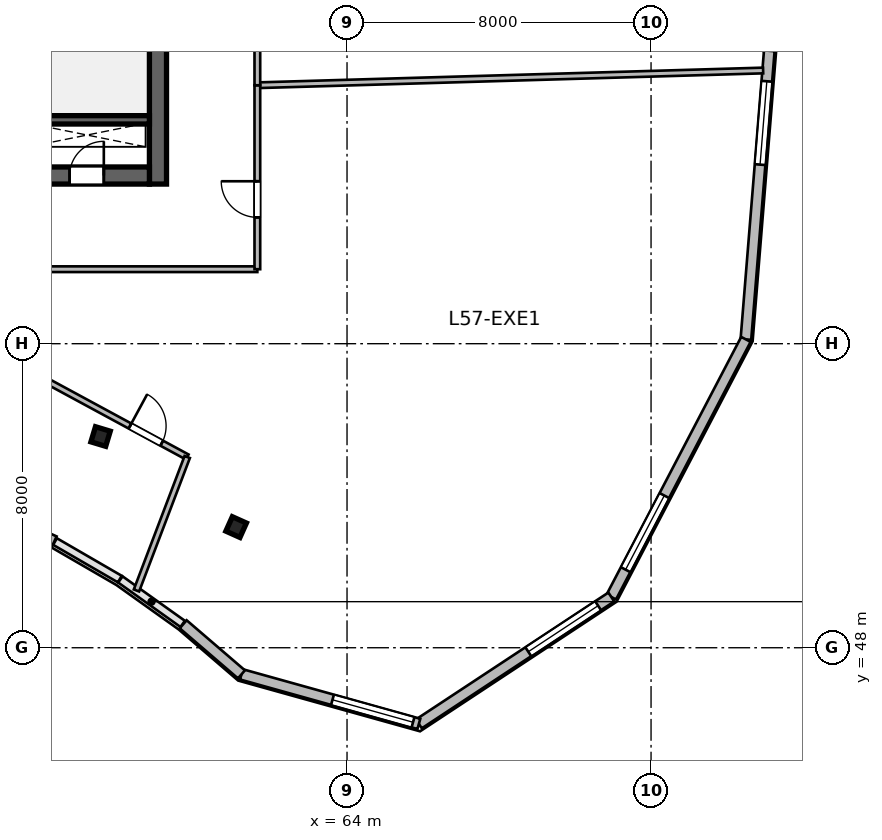
"""IFC4 building model, lengths in metres.
Left out: names, types, materials, properties, quantities, classifications, styles, units other than length and angle.
Written with IfcOpenShell. Run it as: python <this file> out.ifc"""

import sys

from ifc_helpers import new_model, si_unit, direction, frame, frame_2d, origin, origin_2d, place, context, subcontext, project, spatial, rectangle, i_section, extrude, source, transform, mapped, element, fill, save


model = new_model("IFC4")
c1 = context("Model", 3, precision=1e-05, world=origin(), true_north=direction((0.0, 1.0)))
c2 = subcontext(c1, "Body", "Model", "MODEL_VIEW")
j1 = project(units=[si_unit("LENGTHUNIT", "METRE"), si_unit("PLANEANGLEUNIT", "RADIAN")], contexts=[c1])
p1 = place(None, origin())
s1 = spatial("IfcSite", under=j1, at=p1, CompositionType="ELEMENT")
p2 = place(p1, origin())
s2 = spatial("IfcBuilding", under=s1, at=p2, CompositionType="ELEMENT")
p3 = place(p2, frame((0.0, 0.0, 235.2)))
s3 = spatial("IfcBuildingStorey", under=s2, at=p3, CompositionType="ELEMENT", Elevation=235.2)
m1 = source(origin(), c2, "Body", "SweptSolid", [
    extrude(rectangle(XDim=12.0, YDim=0.45, at=frame_2d((6.0, 0.0))), origin(), (0.0, 0.0, 1.0), 3.9),
])
p4 = place(p3, frame((59.025, 60.2, 0.0), z_axis=(0.0, 0.0, 1.0), x_axis=(0.0, 1.0, 0.0)))
e1 = element("IfcWall", 1, at=p4, inside=s3, PredefinedType="SHEAR", context=c2, shape_type="MappedRepresentation", body=[
    mapped(m1, transform((0.0, 0.0, 0.0), scale=1.0)),
])
m2 = source(origin(), c2, "Body", "SweptSolid", [
    extrude(rectangle(XDim=21.6, YDim=0.45, at=frame_2d((10.8, 0.0))), origin(), (0.0, 0.0, 1.0), 3.9),
])
p5 = place(p3, frame((37.2, 60.425, 0.0), z_axis=(0.0, 0.0, 1.0), x_axis=(1.0, 0.0, 0.0)))
e2 = element("IfcWall", 2, at=p5, inside=s3, PredefinedType="SHEAR", context=c2, shape_type="MappedRepresentation", body=[
    mapped(m2, transform((0.0, 0.0, 0.0), scale=1.0)),
])
p6 = place(p5, frame((1.1, 0.0, 0.0)))
e3 = element("IfcOpeningElement", 3, at=p6, cuts=e2, PredefinedType="OPENING", context=c2, shape_type="SweptSolid", body=[
    extrude(rectangle(XDim=1.15, YDim=2.15, at=frame_2d((0.575, 1.075))), frame((0.0, 0.235, 0.0), z_axis=(0.0, -1.0, 0.0), x_axis=(1.0, 0.0, 0.0)), (0.0, 0.0, 1.0), 0.47),
])
p7 = place(p5, frame((19.5, 0.0, 0.0)))
e4 = element("IfcOpeningElement", 4, at=p7, cuts=e2, PredefinedType="OPENING", context=c2, shape_type="SweptSolid", body=[
    extrude(rectangle(XDim=0.9, YDim=2.1, at=frame_2d((0.45, 1.05))), frame((0.0, 0.235, 0.0), z_axis=(0.0, -1.0, 0.0), x_axis=(1.0, 0.0, 0.0)), (0.0, 0.0, 1.0), 0.47),
])
p8 = place(p5, frame((12.02, 0.0, 0.0)))
e5 = element("IfcOpeningElement", 5, at=p8, cuts=e2, PredefinedType="OPENING", context=c2, shape_type="SweptSolid", body=[
    extrude(rectangle(XDim=1.6, YDim=2.15, at=frame_2d((0.8, 1.075))), frame((0.0, 0.235, 0.0), z_axis=(0.0, -1.0, 0.0), x_axis=(1.0, 0.0, 0.0)), (0.0, 0.0, 1.0), 0.47),
])
m3 = source(origin(), c2, "Body", "SweptSolid", [
    extrude(rectangle(XDim=3.27, YDim=0.22, at=frame_2d((1.635, 0.0))), origin(), (0.0, 0.0, 1.0), 3.9),
])
p9 = place(p3, frame((55.53, 61.89, 0.0), z_axis=(0.0, 0.0, 1.0), x_axis=(1.0, 0.0, 0.0)))
e6 = element("IfcWall", 6, at=p9, inside=s3, PredefinedType="SHEAR", context=c2, shape_type="MappedRepresentation", body=[
    mapped(m3, transform((0.0, 0.0, 0.0), scale=1.0)),
])
m4 = source(origin(), c2, "Body", "SweptSolid", [
    extrude(i_section(OverallWidth=0.406, OverallDepth=0.416, WebThickness=0.03, FlangeThickness=0.048, at=origin_2d()), origin(), (0.0, 0.0, 1.0), 3.9),
])
for number, where, z_axis, x_axis in (
    (7, (57.515, 53.558, 0.0), (0.0, 0.0, 1.0), (0.289, 0.957, 0.0)),
    (8, (61.082, 51.175, 0.0), (0.0, 0.0, 1.0), (0.409, 0.912, 0.0)),
):
    element("IfcColumn", number, at=place(p3, frame(where, z_axis=z_axis, x_axis=x_axis)), inside=s3, PredefinedType="COLUMN", context=c2, shape_type="MappedRepresentation", body=[
        mapped(m4, transform((0.0, 0.0, 0.0), scale=1.0)),
    ])
m5 = source(origin(), c2, "Body", "SweptSolid", [
    extrude(rectangle(XDim=6.05, YDim=0.28, at=frame_2d((3.025, 0.0))), origin(), (0.0, 0.0, 1.0), 3.65),
])
p10 = place(p3, frame((72.574, 69.198, 0.0), z_axis=(0.0, 0.0, 1.0), x_axis=(0.41942922905, -0.907788037935, 0.0)))
e9 = element("IfcWall", 9, at=p10, inside=s3, PredefinedType="SOLIDWALL", context=c2, shape_type="MappedRepresentation", body=[
    mapped(m5, transform((0.0, 0.0, 0.0), scale=1.0)),
])
p11 = place(p10, frame((3.437, 0.0, 0.95)))
e10 = element("IfcOpeningElement", 10, at=p11, cuts=e9, PredefinedType="OPENING", context=c2, shape_type="SweptSolid", body=[
    extrude(rectangle(XDim=2.2, YDim=2.1, at=frame_2d((1.1, 1.05))), frame((0.0, 0.15, 0.0), z_axis=(0.0, -1.0, 0.0), x_axis=(1.0, 0.0, 0.0)), (0.0, 0.0, 1.0), 0.3),
])
m6 = source(origin(), c2, "Body", "SweptSolid", [
    extrude(rectangle(XDim=7.618, YDim=0.28, at=frame_2d((3.809, 0.0))), origin(), (0.0, 0.0, 1.0), 3.65),
])
p12 = place(p3, frame((75.112, 63.707, 0.0), z_axis=(0.0, 0.0, 1.0), x_axis=(-0.080820171031, -0.996728699273, 0.0)))
e11 = element("IfcWall", 11, at=p12, inside=s3, PredefinedType="SOLIDWALL", context=c2, shape_type="MappedRepresentation", body=[
    mapped(m6, transform((0.0, 0.0, 0.0), scale=1.0)),
])
p13 = place(p12, frame((0.805, 0.0, 0.95)))
e12 = element("IfcOpeningElement", 12, at=p13, cuts=e11, PredefinedType="OPENING", context=c2, shape_type="SweptSolid", body=[
    extrude(rectangle(XDim=2.2, YDim=2.1, at=frame_2d((1.1, 1.05))), frame((0.0, 0.15, 0.0), z_axis=(0.0, -1.0, 0.0), x_axis=(1.0, 0.0, 0.0)), (0.0, 0.0, 1.0), 0.3),
])
m7 = source(origin(), c2, "Body", "SweptSolid", [
    extrude(rectangle(XDim=7.648, YDim=0.28, at=frame_2d((3.824, 0.0))), origin(), (0.0, 0.0, 1.0), 3.65),
])
p14 = place(p3, frame((74.496, 56.113, 0.0), z_axis=(0.0, 0.0, 1.0), x_axis=(-0.463116873665, -0.886297219519, 0.0)))
e13 = element("IfcWall", 13, at=p14, inside=s3, PredefinedType="SOLIDWALL", context=c2, shape_type="MappedRepresentation", body=[
    mapped(m7, transform((0.0, 0.0, 0.0), scale=1.0)),
])
p15 = place(p14, frame((4.636, 0.0, 0.95)))
e14 = element("IfcOpeningElement", 14, at=p15, cuts=e13, PredefinedType="OPENING", context=c2, shape_type="SweptSolid", body=[
    extrude(rectangle(XDim=2.2, YDim=2.1, at=frame_2d((1.1, 1.05))), frame((0.0, 0.15, 0.0), z_axis=(0.0, -1.0, 0.0), x_axis=(1.0, 0.0, 0.0)), (0.0, 0.0, 1.0), 0.3),
])
m8 = source(origin(), c2, "Body", "SweptSolid", [
    extrude(rectangle(XDim=6.065, YDim=0.28, at=frame_2d((3.033, 0.0))), origin(), (0.0, 0.0, 1.0), 3.65),
])
p16 = place(p3, frame((70.954, 49.335, 0.0), z_axis=(0.0, 0.0, 1.0), x_axis=(-0.834857303202, -0.550466423399, 0.0)))
e15 = element("IfcWall", 15, at=p16, inside=s3, PredefinedType="SOLIDWALL", context=c2, shape_type="MappedRepresentation", body=[
    mapped(m8, transform((0.0, 0.0, 0.0), scale=1.0)),
])
p17 = place(p16, frame((0.416, 0.0, 0.95)))
e16 = element("IfcOpeningElement", 16, at=p17, cuts=e15, PredefinedType="OPENING", context=c2, shape_type="SweptSolid", body=[
    extrude(rectangle(XDim=2.2, YDim=2.1, at=frame_2d((1.1, 1.05))), frame((0.0, 0.15, 0.0), z_axis=(0.0, -1.0, 0.0), x_axis=(1.0, 0.0, 0.0)), (0.0, 0.0, 1.0), 0.3),
])
m9 = source(origin(), c2, "Body", "SweptSolid", [
    extrude(rectangle(XDim=4.847, YDim=0.28, at=frame_2d((2.424, 0.0))), origin(), (0.0, 0.0, 1.0), 3.65),
])
p18 = place(p3, frame((65.891, 45.996, 0.0), z_axis=(0.0, 0.0, 1.0), x_axis=(-0.963208430762, 0.268755500238, 0.0)))
e17 = element("IfcWall", 17, at=p18, inside=s3, PredefinedType="SOLIDWALL", context=c2, shape_type="MappedRepresentation", body=[
    mapped(m9, transform((0.0, 0.0, 0.0), scale=1.0)),
])
p19 = place(p18, frame((0.16, 0.0, 0.95)))
e18 = element("IfcOpeningElement", 18, at=p19, cuts=e17, PredefinedType="OPENING", context=c2, shape_type="SweptSolid", body=[
    extrude(rectangle(XDim=2.2, YDim=2.1, at=frame_2d((1.1, 1.05))), frame((0.0, 0.15, 0.0), z_axis=(0.0, -1.0, 0.0), x_axis=(1.0, 0.0, 0.0)), (0.0, 0.0, 1.0), 0.3),
])
m10 = source(origin(), c2, "Body", "SweptSolid", [
    extrude(rectangle(XDim=2.022, YDim=0.28, at=frame_2d((1.011, 0.0))), origin(), (0.0, 0.0, 1.0), 3.65),
])
p20 = place(p3, frame((61.222, 47.299, 0.0), z_axis=(0.0, 0.0, 1.0), x_axis=(-0.758343943716, 0.651854633358, 0.0)))
e19 = element("IfcWall", 19, at=p20, inside=s3, PredefinedType="SOLIDWALL", context=c2, shape_type="MappedRepresentation", body=[
    mapped(m10, transform((0.0, 0.0, 0.0), scale=1.0)),
])
m11 = source(origin(), c2, "Body", "SweptSolid", [
    extrude(rectangle(XDim=1.933, YDim=0.28, at=frame_2d((0.966, 0.0))), origin(), (0.0, 0.0, 1.0), 3.65),
])
p21 = place(p3, frame((56.3, 50.802, 0.0), z_axis=(0.0, 0.0, 1.0), x_axis=(-0.910478916145, 0.413555489936, 0.0)))
e20 = element("IfcWall", 20, at=p21, inside=s3, PredefinedType="SOLIDWALL", context=c2, shape_type="MappedRepresentation", body=[
    mapped(m11, transform((0.0, 0.0, 0.0), scale=1.0)),
])
m12 = source(origin(), c2, "Body", "SweptSolid", [
    extrude(rectangle(XDim=4.775, YDim=0.15, at=frame_2d((2.387, 0.0))), origin(), (0.0, 0.0, 1.0), 3.65),
])
p22 = place(p3, frame((55.596, 55.292, 0.0), z_axis=(0.0, 0.0, 1.0), x_axis=(0.879401686059, -0.476080533688, 0.0)))
e21 = element("IfcWall", 21, at=p22, inside=s3, PredefinedType="PARTITIONING", context=c2, shape_type="MappedRepresentation", body=[
    mapped(m12, transform((0.0, 0.0, 0.0), scale=1.0)),
])
p23 = place(p22, frame((3.062, 0.0, 0.0)))
e22 = element("IfcOpeningElement", 22, at=p23, cuts=e21, PredefinedType="OPENING", context=c2, shape_type="SweptSolid", body=[
    extrude(rectangle(XDim=0.95, YDim=2.1, at=frame_2d((0.475, 1.05))), frame((0.0, 0.085, 0.0), z_axis=(0.0, -1.0, 0.0), x_axis=(1.0, 0.0, 0.0)), (0.0, 0.0, 1.0), 0.17),
])
m13 = source(origin(), c2, "Body", "SweptSolid", [
    extrude(rectangle(XDim=3.757, YDim=0.15, at=frame_2d((1.879, 0.0))), origin(), (0.0, 0.0, 1.0), 3.65),
])
p24 = place(p3, frame((58.459, 49.507, 0.0), z_axis=(0.0, 0.0, 1.0), x_axis=(0.355427833237, 0.93470372598, 0.0)))
e23 = element("IfcWall", 23, at=p24, inside=s3, PredefinedType="PARTITIONING", context=c2, shape_type="MappedRepresentation", body=[
    mapped(m13, transform((0.0, 0.0, 0.0), scale=1.0)),
])
m14 = source(origin(), c2, "Body", "SweptSolid", [
    extrude(rectangle(XDim=12.39, YDim=0.15, at=frame_2d((6.195, 0.0))), origin(), (0.0, 0.0, 1.0), 3.65),
])
p25 = place(p3, frame((49.25, 57.96, 0.0), z_axis=(0.0, 0.0, 1.0), x_axis=(1.0, 0.0, 0.0)))
e24 = element("IfcWall", 24, at=p25, inside=s3, PredefinedType="PARTITIONING", context=c2, shape_type="MappedRepresentation", body=[
    mapped(m14, transform((0.0, 0.0, 0.0), scale=1.0)),
])
m15 = source(origin(), c2, "Body", "SweptSolid", [
    extrude(rectangle(XDim=13.315, YDim=0.15, at=frame_2d((6.657, 0.0))), origin(), (0.0, 0.0, 1.0), 3.65),
])
p26 = place(p3, frame((61.64, 62.8, 0.0), z_axis=(0.0, 0.0, 1.0), x_axis=(0.999574400598, 0.029172207124, 0.0)))
e25 = element("IfcWall", 25, at=p26, inside=s3, PredefinedType="PARTITIONING", context=c2, shape_type="MappedRepresentation", body=[
    mapped(m15, transform((0.0, 0.0, 0.0), scale=1.0)),
])
m16 = source(origin(), c2, "Body", "SweptSolid", [
    extrude(rectangle(XDim=4.84, YDim=0.15, at=frame_2d((2.42, 0.0))), origin(), (0.0, 0.0, 1.0), 3.65),
])
p27 = place(p3, frame((61.64, 57.96, 0.0), z_axis=(0.0, 0.0, 1.0), x_axis=(0.0, 1.0, 0.0)))
e26 = element("IfcWall", 26, at=p27, inside=s3, PredefinedType="PARTITIONING", context=c2, shape_type="MappedRepresentation", body=[
    mapped(m16, transform((0.0, 0.0, 0.0), scale=1.0)),
])
p28 = place(p27, frame((1.364, 0.0, 0.0)))
e27 = element("IfcOpeningElement", 27, at=p28, cuts=e26, PredefinedType="OPENING", context=c2, shape_type="SweptSolid", body=[
    extrude(rectangle(XDim=0.95, YDim=2.1, at=frame_2d((0.475, 1.05))), frame((0.0, 0.085, 0.0), z_axis=(0.0, -1.0, 0.0), x_axis=(1.0, 0.0, 0.0)), (0.0, 0.0, 1.0), 0.17),
])
m17 = source(origin(), c2, "Body", "SweptSolid", [
    extrude(rectangle(XDim=13.727, YDim=0.15, at=frame_2d((6.864, 0.0))), origin(), (0.0, 0.0, 1.0), 3.65),
])
p29 = place(p3, frame((61.64, 62.8, 0.0), z_axis=(0.0, 0.0, 1.0), x_axis=(0.0, 1.0, 0.0)))
e28 = element("IfcWall", 28, at=p29, inside=s3, PredefinedType="PARTITIONING", context=c2, shape_type="MappedRepresentation", body=[
    mapped(m17, transform((0.0, 0.0, 0.0), scale=1.0)),
])
p30 = place(p29, frame((4.741, 0.0, 0.0)))
e29 = element("IfcOpeningElement", 29, at=p30, cuts=e28, PredefinedType="OPENING", context=c2, shape_type="SweptSolid", body=[
    extrude(rectangle(XDim=0.95, YDim=2.1, at=frame_2d((0.475, 1.05))), frame((0.0, 0.085, 0.0), z_axis=(0.0, -1.0, 0.0), x_axis=(1.0, 0.0, 0.0)), (0.0, 0.0, 1.0), 0.17),
])
m18 = source(origin(), c2, "Body", "SweptSolid", [
    extrude(rectangle(XDim=2.2, YDim=2.1, at=frame_2d((1.1, 1.05))), frame((0.0, 0.03, 0.0), z_axis=(0.0, -1.0, 0.0), x_axis=(1.0, 0.0, 0.0)), (0.0, 0.0, 1.0), 0.06),
])
p31 = place(p13, origin())
e30 = element("IfcWindow", 30, at=p31, inside=s3, PartitioningType="TRIPLE_PANEL_VERTICAL", PredefinedType="WINDOW", context=c2, shape_type="MappedRepresentation", body=[
    mapped(m18, transform((0.0, 0.0, 0.0), scale=1.0)),
])
fill(e12, e30)
p32 = place(p15, origin())
e31 = element("IfcWindow", 31, at=p32, inside=s3, PartitioningType="TRIPLE_PANEL_VERTICAL", PredefinedType="WINDOW", context=c2, shape_type="MappedRepresentation", body=[
    mapped(m18, transform((0.0, 0.0, 0.0), scale=1.0)),
])
fill(e14, e31)
p33 = place(p17, origin())
e32 = element("IfcWindow", 32, at=p33, inside=s3, PartitioningType="TRIPLE_PANEL_VERTICAL", PredefinedType="WINDOW", context=c2, shape_type="MappedRepresentation", body=[
    mapped(m18, transform((0.0, 0.0, 0.0), scale=1.0)),
])
fill(e16, e32)
p34 = place(p19, origin())
e33 = element("IfcWindow", 33, at=p34, inside=s3, PartitioningType="TRIPLE_PANEL_VERTICAL", PredefinedType="WINDOW", context=c2, shape_type="MappedRepresentation", body=[
    mapped(m18, transform((0.0, 0.0, 0.0), scale=1.0)),
])
fill(e18, e33)
m19 = source(origin(), c2, "Body", "SweptSolid", [
    extrude(rectangle(XDim=0.9, YDim=2.1, at=frame_2d((0.45, 1.05))), frame((0.0, 0.025, 0.0), z_axis=(0.0, -1.0, 0.0), x_axis=(1.0, 0.0, 0.0)), (0.0, 0.0, 1.0), 0.05),
])
p35 = place(p7, origin())
e34 = element("IfcDoor", 34, at=p35, inside=s3, OperationType="SINGLE_SWING_RIGHT", PredefinedType="DOOR", context=c2, shape_type="MappedRepresentation", body=[
    mapped(m19, transform((0.0, 0.0, 0.0), scale=1.0)),
])
fill(e4, e34)
m20 = source(origin(), c2, "Body", "SweptSolid", [
    extrude(rectangle(XDim=0.95, YDim=2.1, at=frame_2d((0.475, 1.05))), frame((0.0, 0.025, 0.0), z_axis=(0.0, -1.0, 0.0), x_axis=(1.0, 0.0, 0.0)), (0.0, 0.0, 1.0), 0.05),
])
p36 = place(p23, origin())
e35 = element("IfcDoor", 35, at=p36, inside=s3, OperationType="SINGLE_SWING_LEFT", PredefinedType="DOOR", context=c2, shape_type="MappedRepresentation", body=[
    mapped(m20, transform((0.0, 0.0, 0.0), scale=1.0)),
])
fill(e22, e35)
p37 = place(p28, origin())
e36 = element("IfcDoor", 36, at=p37, inside=s3, OperationType="SINGLE_SWING_RIGHT", PredefinedType="DOOR", context=c2, shape_type="MappedRepresentation", body=[
    mapped(m20, transform((0.0, 0.0, 0.0), scale=1.0)),
])
fill(e27, e36)
save(model, sys.argv[1])
